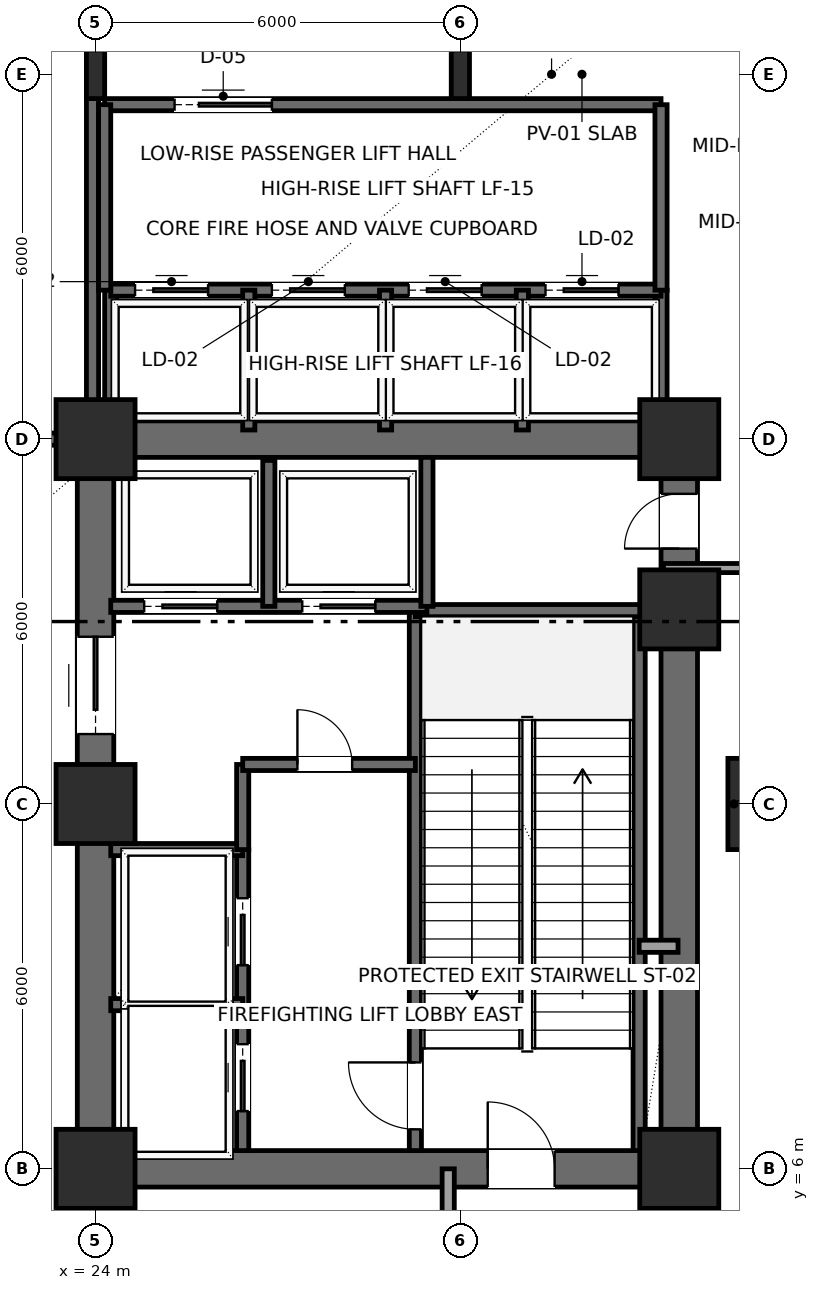
"""IFC4 building model, lengths in metres.
Left out: names, types, materials, properties, quantities, classifications, styles, units other than length and angle.
Written with IfcOpenShell. Run it as: python <this file> out.ifc"""

import sys

from ifc_helpers import new_model, si_unit, direction, frame, frame_2d, origin, origin_2d, place, context, subcontext, project, spatial, rectangle, i_section, extrude, element, fill, save


model = new_model("IFC4")
c1 = context("Model", 3, precision=1e-05, world=origin(), true_north=direction((0.0, 1.0)))
c2 = subcontext(c1, "Body", "Model", "MODEL_VIEW")
j1 = project(units=[si_unit("LENGTHUNIT", "METRE"), si_unit("PLANEANGLEUNIT", "RADIAN")], contexts=[c1])
p1 = place(None, origin())
s1 = spatial("IfcSite", under=j1, at=p1, CompositionType="ELEMENT")
p2 = place(p1, origin())
s2 = spatial("IfcBuilding", under=s1, at=p2, CompositionType="ELEMENT")
p3 = place(p2, origin())
s3 = spatial("IfcBuildingStorey", under=s2, at=p3, CompositionType="ELEMENT", Elevation=0.0)
for number, where, z_axis, x_axis in (
    (1, (24.0, 6.0, 0.0), (0.0, 0.0, 1.0), (1.0, 0.0, 0.0)),
    (2, (24.0, 12.0, 0.0), (0.0, 0.0, 1.0), (1.0, 0.0, 0.0)),
    (3, (24.0, 18.0, 0.0), (0.0, 0.0, 1.0), (1.0, 0.0, 0.0)),
    (4, (33.6, 6.0, 0.0), (0.0, 0.0, 1.0), (1.0, 0.0, 0.0)),
    (5, (33.6, 15.2, 0.0), (0.0, 0.0, 1.0), (1.0, 0.0, 0.0)),
    (6, (33.6, 18.0, 0.0), (0.0, 0.0, 1.0), (1.0, 0.0, 0.0)),
):
    element("IfcColumn", number, at=place(p3, frame(where, z_axis=z_axis, x_axis=x_axis)), inside=s3, PredefinedType="COLUMN", context=c2, shape_type="SweptSolid", body=[
        extrude(rectangle(XDim=1.3, YDim=1.3, at=origin_2d()), origin(), (0.0, 0.0, 1.0), 5.7),
    ])
for number, where, z_axis, x_axis in (
    (7, (24.0, 24.0, 0.0), (0.0, 0.0, 1.0), (1.0, 0.0, 0.0)),
    (8, (30.0, 24.0, 0.0), (0.0, 0.0, 1.0), (1.0, 0.0, 0.0)),
):
    element("IfcColumn", number, at=place(p3, frame(where, z_axis=z_axis, x_axis=x_axis)), inside=s3, PredefinedType="COLUMN", context=c2, shape_type="SweptSolid", body=[
        extrude(i_section(OverallWidth=0.3, OverallDepth=0.8, WebThickness=0.018, FlangeThickness=0.033, FilletRadius=0.03, at=origin_2d()), origin(), (0.0, 0.0, 1.0), 5.7),
    ])
p4 = place(p3, frame((35.15, 12.0, 0.0), z_axis=(0.0, 0.0, 1.0), x_axis=(1.0, 0.0, 0.0)))
e9 = element("IfcColumn", 9, at=p4, inside=s3, PredefinedType="COLUMN", context=c2, shape_type="SweptSolid", body=[
    extrude(rectangle(XDim=1.5, YDim=1.5, at=origin_2d()), origin(), (0.0, 0.0, 1.0), 5.7),
])
p5 = place(p3, frame((24.0, 6.0, 0.0), z_axis=(0.0, 0.0, 1.0), x_axis=(1.0, 0.0, 0.0)))
e10 = element("IfcWall", 10, at=p5, inside=s3, PredefinedType="SHEAR", context=c2, shape_type="SweptSolid", body=[
    extrude(rectangle(XDim=9.6, YDim=0.6, at=frame_2d((4.8, 0.0))), origin(), (0.0, 0.0, 1.0), 5.4),
])
p6 = place(p5, frame((6.45, 0.0, 0.0)))
e11 = element("IfcOpeningElement", 11, at=p6, cuts=e10, PredefinedType="OPENING", context=c2, shape_type="SweptSolid", body=[
    extrude(rectangle(XDim=1.1, YDim=2.2, at=frame_2d((0.55, 1.1))), frame((0.0, 0.31, 0.0), z_axis=(0.0, -1.0, 0.0), x_axis=(1.0, 0.0, 0.0)), (0.0, 0.0, 1.0), 0.62),
])
p7 = place(p3, frame((24.0, 18.0, 0.0), z_axis=(0.0, 0.0, 1.0), x_axis=(1.0, 0.0, 0.0)))
e12 = element("IfcWall", 12, at=p7, inside=s3, PredefinedType="SHEAR", context=c2, shape_type="SweptSolid", body=[
    extrude(rectangle(XDim=9.6, YDim=0.6, at=frame_2d((4.8, 0.0))), origin(), (0.0, 0.0, 1.0), 5.4),
])
p8 = place(p3, frame((24.0, 6.0, 0.0), z_axis=(0.0, 0.0, 1.0), x_axis=(0.0, 1.0, 0.0)))
e13 = element("IfcWall", 13, at=p8, inside=s3, PredefinedType="SHEAR", context=c2, shape_type="SweptSolid", body=[
    extrude(rectangle(XDim=12.0, YDim=0.6, at=frame_2d((6.0, 0.0))), origin(), (0.0, 0.0, 1.0), 5.4),
])
p9 = place(p8, frame((7.15, 0.0, 0.0)))
e14 = element("IfcOpeningElement", 14, at=p9, cuts=e13, PredefinedType="OPENING", context=c2, shape_type="SweptSolid", body=[
    extrude(rectangle(XDim=1.6, YDim=2.3, at=frame_2d((0.8, 1.15))), frame((0.0, 0.31, 0.0), z_axis=(0.0, -1.0, 0.0), x_axis=(1.0, 0.0, 0.0)), (0.0, 0.0, 1.0), 0.62),
])
p10 = place(p3, frame((33.6, 6.0, 0.0), z_axis=(0.0, 0.0, 1.0), x_axis=(0.0, 1.0, 0.0)))
e15 = element("IfcWall", 15, at=p10, inside=s3, PredefinedType="SHEAR", context=c2, shape_type="SweptSolid", body=[
    extrude(rectangle(XDim=12.0, YDim=0.6, at=frame_2d((6.0, 0.0))), origin(), (0.0, 0.0, 1.0), 5.4),
])
p11 = place(p10, frame((10.2, 0.0, 0.0)))
e16 = element("IfcOpeningElement", 16, at=p11, cuts=e15, PredefinedType="OPENING", context=c2, shape_type="SweptSolid", body=[
    extrude(rectangle(XDim=0.9, YDim=2.15, at=frame_2d((0.45, 1.075))), frame((0.0, 0.31, 0.0), z_axis=(0.0, -1.0, 0.0), x_axis=(1.0, 0.0, 0.0)), (0.0, 0.0, 1.0), 0.62),
])
p12 = place(p3, frame((29.26, 6.3, 0.0), z_axis=(0.0, 0.0, 1.0), x_axis=(0.0, 1.0, 0.0)))
e17 = element("IfcWall", 17, at=p12, inside=s3, PredefinedType="SHEAR", context=c2, shape_type="SweptSolid", body=[
    extrude(rectangle(XDim=8.88, YDim=0.2, at=frame_2d((4.44, 0.0))), origin(), (0.0, 0.0, 1.0), 5.4),
])
p13 = place(p12, frame((0.35, 0.0, 0.0)))
e18 = element("IfcOpeningElement", 18, at=p13, cuts=e17, PredefinedType="OPENING", context=c2, shape_type="SweptSolid", body=[
    extrude(rectangle(XDim=1.1, YDim=2.2, at=frame_2d((0.55, 1.1))), frame((0.0, 0.11, 0.0), z_axis=(0.0, -1.0, 0.0), x_axis=(1.0, 0.0, 0.0)), (0.0, 0.0, 1.0), 0.22),
])
p14 = place(p3, frame((32.94, 6.3, 0.0), z_axis=(0.0, 0.0, 1.0), x_axis=(0.0, 1.0, 0.0)))
e19 = element("IfcWall", 19, at=p14, inside=s3, PredefinedType="SHEAR", context=c2, shape_type="SweptSolid", body=[
    extrude(rectangle(XDim=8.88, YDim=0.2, at=frame_2d((4.44, 0.0))), origin(), (0.0, 0.0, 1.0), 5.4),
])
p15 = place(p3, frame((29.26, 15.18, 0.0), z_axis=(0.0, 0.0, 1.0), x_axis=(1.0, 0.0, 0.0)))
e20 = element("IfcWall", 20, at=p15, inside=s3, PredefinedType="SHEAR", context=c2, shape_type="SweptSolid", body=[
    extrude(rectangle(XDim=4.04, YDim=0.2, at=frame_2d((2.02, 0.0))), origin(), (0.0, 0.0, 1.0), 5.4),
])
p16 = place(p3, frame((26.42, 6.3, 0.0), z_axis=(0.0, 0.0, 1.0), x_axis=(0.0, 1.0, 0.0)))
e21 = element("IfcWall", 21, at=p16, inside=s3, PredefinedType="SHEAR", context=c2, shape_type="SweptSolid", body=[
    extrude(rectangle(XDim=4.95, YDim=0.2, at=frame_2d((2.475, 0.0))), origin(), (0.0, 0.0, 1.0), 5.4),
])
p17 = place(p16, frame((0.65, 0.0, 0.0)))
e22 = element("IfcOpeningElement", 22, at=p17, cuts=e21, PredefinedType="OPENING", context=c2, shape_type="SweptSolid", body=[
    extrude(rectangle(XDim=1.1, YDim=2.2, at=frame_2d((0.55, 1.1))), frame((0.0, 0.11, 0.0), z_axis=(0.0, -1.0, 0.0), x_axis=(1.0, 0.0, 0.0)), (0.0, 0.0, 1.0), 0.22),
])
p18 = place(p16, frame((3.05, 0.0, 0.0)))
e23 = element("IfcOpeningElement", 23, at=p18, cuts=e21, PredefinedType="OPENING", context=c2, shape_type="SweptSolid", body=[
    extrude(rectangle(XDim=1.1, YDim=2.2, at=frame_2d((0.55, 1.1))), frame((0.0, 0.11, 0.0), z_axis=(0.0, -1.0, 0.0), x_axis=(1.0, 0.0, 0.0)), (0.0, 0.0, 1.0), 0.22),
])
for number, where, z_axis, x_axis in (
    (24, (24.25, 8.7, 0.0), (0.0, 0.0, 1.0), (1.0, 0.0, 0.0)),
    (25, (24.25, 11.25, 0.0), (0.0, 0.0, 1.0), (1.0, 0.0, 0.0)),
):
    element("IfcWall", number, at=place(p3, frame(where, z_axis=z_axis, x_axis=x_axis)), inside=s3, PredefinedType="SHEAR", context=c2, shape_type="SweptSolid", body=[
        extrude(rectangle(XDim=2.17, YDim=0.2, at=frame_2d((1.085, 0.0))), origin(), (0.0, 0.0, 1.0), 5.4),
    ])
p19 = place(p3, frame((26.42, 11.25, 0.0), z_axis=(0.0, 0.0, 1.0), x_axis=(0.0, 1.0, 0.0)))
e26 = element("IfcWall", 26, at=p19, inside=s3, PredefinedType="SHEAR", context=c2, shape_type="SweptSolid", body=[
    extrude(rectangle(XDim=1.4, YDim=0.2, at=frame_2d((0.7, 0.0))), origin(), (0.0, 0.0, 1.0), 5.4),
])
p20 = place(p3, frame((26.42, 12.65, 0.0), z_axis=(0.0, 0.0, 1.0), x_axis=(1.0, 0.0, 0.0)))
e27 = element("IfcWall", 27, at=p20, inside=s3, PredefinedType="SHEAR", context=c2, shape_type="SweptSolid", body=[
    extrude(rectangle(XDim=2.84, YDim=0.2, at=frame_2d((1.42, 0.0))), origin(), (0.0, 0.0, 1.0), 5.4),
])
p21 = place(p20, frame((0.9, 0.0, 0.0)))
e28 = element("IfcOpeningElement", 28, at=p21, cuts=e27, PredefinedType="OPENING", context=c2, shape_type="SweptSolid", body=[
    extrude(rectangle(XDim=0.9, YDim=2.15, at=frame_2d((0.45, 1.075))), frame((0.0, 0.11, 0.0), z_axis=(0.0, -1.0, 0.0), x_axis=(1.0, 0.0, 0.0)), (0.0, 0.0, 1.0), 0.22),
])
p22 = place(p3, frame((32.94, 9.66, 0.0), z_axis=(0.0, 0.0, 1.0), x_axis=(1.0, 0.0, 0.0)))
e29 = element("IfcWall", 29, at=p22, inside=s3, PredefinedType="SOLIDWALL", context=c2, shape_type="SweptSolid", body=[
    extrude(rectangle(XDim=0.64, YDim=0.2, at=frame_2d((0.32, 0.0))), origin(), (0.0, 0.0, 1.0), 5.4),
])
p23 = place(p3, frame((24.25, 15.25, 0.0), z_axis=(0.0, 0.0, 1.0), x_axis=(1.0, 0.0, 0.0)))
e30 = element("IfcWall", 30, at=p23, inside=s3, PredefinedType="SHEAR", context=c2, shape_type="SweptSolid", body=[
    extrude(rectangle(XDim=5.2, YDim=0.2, at=frame_2d((2.6, 0.0))), origin(), (0.0, 0.0, 1.0), 5.4),
])
p24 = place(p23, frame((0.55, 0.0, 0.0)))
e31 = element("IfcOpeningElement", 31, at=p24, cuts=e30, PredefinedType="OPENING", context=c2, shape_type="SweptSolid", body=[
    extrude(rectangle(XDim=1.2, YDim=2.2, at=frame_2d((0.6, 1.1))), frame((0.0, 0.11, 0.0), z_axis=(0.0, -1.0, 0.0), x_axis=(1.0, 0.0, 0.0)), (0.0, 0.0, 1.0), 0.22),
])
p25 = place(p23, frame((3.15, 0.0, 0.0)))
e32 = element("IfcOpeningElement", 32, at=p25, cuts=e30, PredefinedType="OPENING", context=c2, shape_type="SweptSolid", body=[
    extrude(rectangle(XDim=1.2, YDim=2.2, at=frame_2d((0.6, 1.1))), frame((0.0, 0.11, 0.0), z_axis=(0.0, -1.0, 0.0), x_axis=(1.0, 0.0, 0.0)), (0.0, 0.0, 1.0), 0.22),
])
p26 = place(p3, frame((26.85, 15.25, 0.0), z_axis=(0.0, 0.0, 1.0), x_axis=(0.0, 1.0, 0.0)))
e33 = element("IfcWall", 33, at=p26, inside=s3, PredefinedType="SHEAR", context=c2, shape_type="SweptSolid", body=[
    extrude(rectangle(XDim=2.4, YDim=0.2, at=frame_2d((1.2, 0.0))), origin(), (0.0, 0.0, 1.0), 5.4),
])
p27 = place(p3, frame((29.45, 15.25, 0.0), z_axis=(0.0, 0.0, 1.0), x_axis=(0.0, 1.0, 0.0)))
e34 = element("IfcWall", 34, at=p27, inside=s3, PredefinedType="SHEAR", context=c2, shape_type="SweptSolid", body=[
    extrude(rectangle(XDim=2.45, YDim=0.2, at=frame_2d((1.225, 0.0))), origin(), (0.0, 0.0, 1.0), 5.4),
])
p28 = place(p3, frame((20.45, 18.0, 0.0), z_axis=(0.0, 0.0, 1.0), x_axis=(1.0, 0.0, 0.0)))
e35 = element("IfcWall", 35, at=p28, inside=s3, PredefinedType="SHEAR", context=c2, shape_type="SweptSolid", body=[
    extrude(rectangle(XDim=3.5, YDim=0.2, at=frame_2d((1.75, 0.0))), origin(), (0.0, 0.0, 1.0), 5.4),
])
p29 = place(p28, frame((0.95, 0.0, 0.0)))
e36 = element("IfcOpeningElement", 36, at=p29, cuts=e35, PredefinedType="OPENING", context=c2, shape_type="SweptSolid", body=[
    extrude(rectangle(XDim=1.6, YDim=2.3, at=frame_2d((0.8, 1.15))), frame((0.0, 0.11, 0.0), z_axis=(0.0, -1.0, 0.0), x_axis=(1.0, 0.0, 0.0)), (0.0, 0.0, 1.0), 0.22),
])
p30 = place(p3, frame((23.95, 18.0, 0.0), z_axis=(0.0, 0.0, 1.0), x_axis=(0.0, 1.0, 0.0)))
e37 = element("IfcWall", 37, at=p30, inside=s3, PredefinedType="SHEAR", context=c2, shape_type="SweptSolid", body=[
    extrude(rectangle(XDim=9.3, YDim=0.2, at=frame_2d((4.65, 0.0))), origin(), (0.0, 0.0, 1.0), 5.4),
])
for number, where, z_axis, x_axis in (
    (38, (33.3, 18.1, 0.0), (0.0, 0.0, 1.0), (0.0, 1.0, 0.0)),
    (39, (24.25, 18.1, 0.0), (0.0, 0.0, 1.0), (0.0, 1.0, 0.0)),
):
    element("IfcWall", number, at=place(p3, frame(where, z_axis=z_axis, x_axis=x_axis)), inside=s3, PredefinedType="SHEAR", context=c2, shape_type="SweptSolid", body=[
        extrude(rectangle(XDim=2.35, YDim=0.2, at=frame_2d((1.175, 0.0))), origin(), (0.0, 0.0, 1.0), 5.4),
    ])
p31 = place(p3, frame((24.25, 20.45, 0.0), z_axis=(0.0, 0.0, 1.0), x_axis=(1.0, 0.0, 0.0)))
e40 = element("IfcWall", 40, at=p31, inside=s3, PredefinedType="SHEAR", context=c2, shape_type="SweptSolid", body=[
    extrude(rectangle(XDim=9.05, YDim=0.2, at=frame_2d((4.525, 0.0))), origin(), (0.0, 0.0, 1.0), 5.4),
])
p32 = place(p31, frame((0.4, 0.0, 0.0)))
e41 = element("IfcOpeningElement", 41, at=p32, cuts=e40, PredefinedType="OPENING", context=c2, shape_type="SweptSolid", body=[
    extrude(rectangle(XDim=1.2, YDim=2.2, at=frame_2d((0.6, 1.1))), frame((0.0, 0.11, 0.0), z_axis=(0.0, -1.0, 0.0), x_axis=(1.0, 0.0, 0.0)), (0.0, 0.0, 1.0), 0.22),
])
p33 = place(p31, frame((2.65, 0.0, 0.0)))
e42 = element("IfcOpeningElement", 42, at=p33, cuts=e40, PredefinedType="OPENING", context=c2, shape_type="SweptSolid", body=[
    extrude(rectangle(XDim=1.2, YDim=2.2, at=frame_2d((0.6, 1.1))), frame((0.0, 0.11, 0.0), z_axis=(0.0, -1.0, 0.0), x_axis=(1.0, 0.0, 0.0)), (0.0, 0.0, 1.0), 0.22),
])
p34 = place(p31, frame((4.9, 0.0, 0.0)))
e43 = element("IfcOpeningElement", 43, at=p34, cuts=e40, PredefinedType="OPENING", context=c2, shape_type="SweptSolid", body=[
    extrude(rectangle(XDim=1.2, YDim=2.2, at=frame_2d((0.6, 1.1))), frame((0.0, 0.11, 0.0), z_axis=(0.0, -1.0, 0.0), x_axis=(1.0, 0.0, 0.0)), (0.0, 0.0, 1.0), 0.22),
])
p35 = place(p31, frame((7.15, 0.0, 0.0)))
e44 = element("IfcOpeningElement", 44, at=p35, cuts=e40, PredefinedType="OPENING", context=c2, shape_type="SweptSolid", body=[
    extrude(rectangle(XDim=1.2, YDim=2.2, at=frame_2d((0.6, 1.1))), frame((0.0, 0.11, 0.0), z_axis=(0.0, -1.0, 0.0), x_axis=(1.0, 0.0, 0.0)), (0.0, 0.0, 1.0), 0.22),
])
for number, where, z_axis, x_axis in (
    (45, (26.52, 18.15, 0.0), (0.0, 0.0, 1.0), (0.0, 1.0, 0.0)),
    (46, (28.77, 18.15, 0.0), (0.0, 0.0, 1.0), (0.0, 1.0, 0.0)),
    (47, (31.02, 18.15, 0.0), (0.0, 0.0, 1.0), (0.0, 1.0, 0.0)),
):
    element("IfcWall", number, at=place(p3, frame(where, z_axis=z_axis, x_axis=x_axis)), inside=s3, PredefinedType="SHEAR", context=c2, shape_type="SweptSolid", body=[
        extrude(rectangle(XDim=2.3, YDim=0.2, at=frame_2d((1.15, 0.0))), origin(), (0.0, 0.0, 1.0), 5.4),
    ])
p36 = place(p3, frame((24.15, 23.5, 0.0), z_axis=(0.0, 0.0, 1.0), x_axis=(1.0, 0.0, 0.0)))
e48 = element("IfcWall", 48, at=p36, inside=s3, PredefinedType="SHEAR", context=c2, shape_type="SweptSolid", body=[
    extrude(rectangle(XDim=9.15, YDim=0.2, at=frame_2d((4.575, 0.0))), origin(), (0.0, 0.0, 1.0), 5.4),
])
p37 = place(p36, frame((1.15, 0.0, 0.0)))
e49 = element("IfcOpeningElement", 49, at=p37, cuts=e48, PredefinedType="OPENING", context=c2, shape_type="SweptSolid", body=[
    extrude(rectangle(XDim=1.6, YDim=2.3, at=frame_2d((0.8, 1.15))), frame((0.0, 0.11, 0.0), z_axis=(0.0, -1.0, 0.0), x_axis=(1.0, 0.0, 0.0)), (0.0, 0.0, 1.0), 0.22),
])
for number, where, z_axis, x_axis in (
    (50, (33.3, 20.45, 0.0), (0.0, 0.0, 1.0), (0.0, 1.0, 0.0)),
    (51, (24.15, 20.45, 0.0), (0.0, 0.0, 1.0), (0.0, 1.0, 0.0)),
):
    element("IfcWall", number, at=place(p3, frame(where, z_axis=z_axis, x_axis=x_axis)), inside=s3, PredefinedType="SHEAR", context=c2, shape_type="SweptSolid", body=[
        extrude(rectangle(XDim=3.05, YDim=0.2, at=frame_2d((1.525, 0.0))), origin(), (0.0, 0.0, 1.0), 5.4),
    ])
p38 = place(p3, frame((24.0, 0.22, 0.0), z_axis=(0.0, 0.0, 1.0), x_axis=(0.0, 1.0, 0.0)))
e52 = element("IfcWall", 52, at=p38, inside=s3, PredefinedType="SOLIDWALL", context=c2, shape_type="SweptSolid", body=[
    extrude(rectangle(XDim=5.78, YDim=0.2, at=frame_2d((2.89, 0.0))), origin(), (0.0, 0.0, 1.0), 3.492),
])
p39 = place(p3, frame((29.8, 0.22, 0.0), z_axis=(0.0, 0.0, 1.0), x_axis=(0.0, 1.0, 0.0)))
e53 = element("IfcWall", 53, at=p39, inside=s3, PredefinedType="SOLIDWALL", context=c2, shape_type="SweptSolid", body=[
    extrude(rectangle(XDim=5.78, YDim=0.2, at=frame_2d((2.89, 0.0))), origin(), (0.0, 0.0, 1.0), 5.4),
])
p40 = place(p3, frame((36.15, 15.88, 0.0), z_axis=(0.0, 0.0, 1.0), x_axis=(-1.0, 0.0, 0.0)))
e54 = element("IfcWall", 54, at=p40, inside=s3, PredefinedType="PARTITIONING", context=c2, shape_type="SweptSolid", body=[
    extrude(rectangle(XDim=2.81, YDim=0.15, at=frame_2d((1.405, 0.0))), origin(), (0.0, 0.0, 1.0), 5.4),
])
p41 = place(p6, origin())
e55 = element("IfcDoor", 55, at=p41, inside=s3, OperationType="SINGLE_SWING_LEFT", PredefinedType="DOOR", context=c2, shape_type="SweptSolid", body=[
    extrude(rectangle(XDim=1.1, YDim=2.2, at=frame_2d((0.55, 1.1))), frame((0.0, 0.025, 0.0), z_axis=(0.0, -1.0, 0.0), x_axis=(1.0, 0.0, 0.0)), (0.0, 0.0, 1.0), 0.05),
])
fill(e11, e55)
p42 = place(p9, origin())
e56 = element("IfcDoor", 56, at=p42, inside=s3, OperationType="DOUBLE_DOOR_SLIDING", PredefinedType="DOOR", context=c2, shape_type="SweptSolid", body=[
    extrude(rectangle(XDim=1.6, YDim=2.3, at=frame_2d((0.8, 1.15))), frame((0.0, 0.025, 0.0), z_axis=(0.0, -1.0, 0.0), x_axis=(1.0, 0.0, 0.0)), (0.0, 0.0, 1.0), 0.05),
])
fill(e14, e56)
p43 = place(p11, origin())
e57 = element("IfcDoor", 57, at=p43, inside=s3, OperationType="SINGLE_SWING_LEFT", PredefinedType="DOOR", context=c2, shape_type="SweptSolid", body=[
    extrude(rectangle(XDim=0.9, YDim=2.15, at=frame_2d((0.45, 1.075))), frame((0.0, 0.025, 0.0), z_axis=(0.0, -1.0, 0.0), x_axis=(1.0, 0.0, 0.0)), (0.0, 0.0, 1.0), 0.05),
])
fill(e16, e57)
p44 = place(p13, origin())
e58 = element("IfcDoor", 58, at=p44, inside=s3, OperationType="SINGLE_SWING_RIGHT", PredefinedType="DOOR", context=c2, shape_type="SweptSolid", body=[
    extrude(rectangle(XDim=1.1, YDim=2.2, at=frame_2d((0.55, 1.1))), frame((0.0, 0.025, 0.0), z_axis=(0.0, -1.0, 0.0), x_axis=(1.0, 0.0, 0.0)), (0.0, 0.0, 1.0), 0.05),
])
fill(e18, e58)
p45 = place(p17, origin())
e59 = element("IfcDoor", 59, at=p45, inside=s3, OperationType="SLIDING_TO_LEFT", PredefinedType="DOOR", context=c2, shape_type="SweptSolid", body=[
    extrude(rectangle(XDim=1.1, YDim=2.2, at=frame_2d((0.55, 1.1))), frame((0.0, 0.025, 0.0), z_axis=(0.0, -1.0, 0.0), x_axis=(1.0, 0.0, 0.0)), (0.0, 0.0, 1.0), 0.05),
])
fill(e22, e59)
p46 = place(p18, origin())
e60 = element("IfcDoor", 60, at=p46, inside=s3, OperationType="SLIDING_TO_LEFT", PredefinedType="DOOR", context=c2, shape_type="SweptSolid", body=[
    extrude(rectangle(XDim=1.1, YDim=2.2, at=frame_2d((0.55, 1.1))), frame((0.0, 0.025, 0.0), z_axis=(0.0, -1.0, 0.0), x_axis=(1.0, 0.0, 0.0)), (0.0, 0.0, 1.0), 0.05),
])
fill(e23, e60)
p47 = place(p21, origin())
e61 = element("IfcDoor", 61, at=p47, inside=s3, OperationType="SINGLE_SWING_LEFT", PredefinedType="DOOR", context=c2, shape_type="SweptSolid", body=[
    extrude(rectangle(XDim=0.9, YDim=2.15, at=frame_2d((0.45, 1.075))), frame((0.0, 0.025, 0.0), z_axis=(0.0, -1.0, 0.0), x_axis=(1.0, 0.0, 0.0)), (0.0, 0.0, 1.0), 0.05),
])
fill(e28, e61)
p48 = place(p24, origin())
e62 = element("IfcDoor", 62, at=p48, inside=s3, OperationType="SLIDING_TO_RIGHT", PredefinedType="DOOR", context=c2, shape_type="SweptSolid", body=[
    extrude(rectangle(XDim=1.2, YDim=2.2, at=frame_2d((0.6, 1.1))), frame((0.0, 0.025, 0.0), z_axis=(0.0, -1.0, 0.0), x_axis=(1.0, 0.0, 0.0)), (0.0, 0.0, 1.0), 0.05),
])
fill(e31, e62)
p49 = place(p25, origin())
e63 = element("IfcDoor", 63, at=p49, inside=s3, OperationType="SLIDING_TO_RIGHT", PredefinedType="DOOR", context=c2, shape_type="SweptSolid", body=[
    extrude(rectangle(XDim=1.2, YDim=2.2, at=frame_2d((0.6, 1.1))), frame((0.0, 0.025, 0.0), z_axis=(0.0, -1.0, 0.0), x_axis=(1.0, 0.0, 0.0)), (0.0, 0.0, 1.0), 0.05),
])
fill(e32, e63)
p50 = place(p32, origin())
e64 = element("IfcDoor", 64, at=p50, inside=s3, OperationType="SLIDING_TO_RIGHT", PredefinedType="DOOR", context=c2, shape_type="SweptSolid", body=[
    extrude(rectangle(XDim=1.2, YDim=2.2, at=frame_2d((0.6, 1.1))), frame((0.0, 0.025, 0.0), z_axis=(0.0, -1.0, 0.0), x_axis=(1.0, 0.0, 0.0)), (0.0, 0.0, 1.0), 0.05),
])
fill(e41, e64)
p51 = place(p33, origin())
e65 = element("IfcDoor", 65, at=p51, inside=s3, OperationType="SLIDING_TO_RIGHT", PredefinedType="DOOR", context=c2, shape_type="SweptSolid", body=[
    extrude(rectangle(XDim=1.2, YDim=2.2, at=frame_2d((0.6, 1.1))), frame((0.0, 0.025, 0.0), z_axis=(0.0, -1.0, 0.0), x_axis=(1.0, 0.0, 0.0)), (0.0, 0.0, 1.0), 0.05),
])
fill(e42, e65)
p52 = place(p34, origin())
e66 = element("IfcDoor", 66, at=p52, inside=s3, OperationType="SLIDING_TO_RIGHT", PredefinedType="DOOR", context=c2, shape_type="SweptSolid", body=[
    extrude(rectangle(XDim=1.2, YDim=2.2, at=frame_2d((0.6, 1.1))), frame((0.0, 0.025, 0.0), z_axis=(0.0, -1.0, 0.0), x_axis=(1.0, 0.0, 0.0)), (0.0, 0.0, 1.0), 0.05),
])
fill(e43, e66)
p53 = place(p35, origin())
e67 = element("IfcDoor", 67, at=p53, inside=s3, OperationType="SLIDING_TO_RIGHT", PredefinedType="DOOR", context=c2, shape_type="SweptSolid", body=[
    extrude(rectangle(XDim=1.2, YDim=2.2, at=frame_2d((0.6, 1.1))), frame((0.0, 0.025, 0.0), z_axis=(0.0, -1.0, 0.0), x_axis=(1.0, 0.0, 0.0)), (0.0, 0.0, 1.0), 0.05),
])
fill(e44, e67)
p54 = place(p37, origin())
e68 = element("IfcDoor", 68, at=p54, inside=s3, OperationType="DOUBLE_DOOR_SLIDING", PredefinedType="DOOR", context=c2, shape_type="SweptSolid", body=[
    extrude(rectangle(XDim=1.6, YDim=2.3, at=frame_2d((0.8, 1.15))), frame((0.0, 0.025, 0.0), z_axis=(0.0, -1.0, 0.0), x_axis=(1.0, 0.0, 0.0)), (0.0, 0.0, 1.0), 0.05),
])
fill(e49, e68)
save(model, sys.argv[1])
